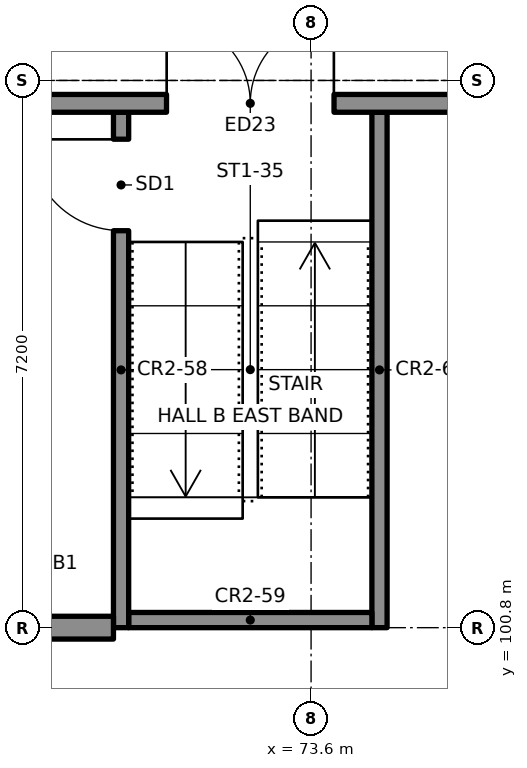
"""IFC4 building model, lengths in metres.
Left out: names, types, materials, properties, quantities, classifications, styles, units other than length and angle.
Written with IfcOpenShell. Run it as: python <this file> out.ifc"""

import sys

from ifc_helpers import new_model, si_unit, direction, frame, frame_2d, origin, place, context, subcontext, project, spatial, rectangle, extrude, element, fill, save


model = new_model("IFC4")
c1 = context("Model", 3, precision=1e-05, world=origin(), true_north=direction((0.0, 1.0)))
c2 = subcontext(c1, "Body", "Model", "MODEL_VIEW")
j1 = project(units=[si_unit("LENGTHUNIT", "METRE"), si_unit("PLANEANGLEUNIT", "RADIAN")], contexts=[c1])
p1 = place(None, origin())
s1 = spatial("IfcSite", under=j1, at=p1, CompositionType="ELEMENT")
p2 = place(p1, origin())
s2 = spatial("IfcBuilding", under=s1, at=p2, CompositionType="ELEMENT")
p3 = place(p2, origin())
s3 = spatial("IfcBuildingStorey", under=s2, at=p3, CompositionType="ELEMENT", Elevation=0.0)
p4 = place(p3, frame((26.8, 107.699, 0.0), z_axis=(0.0, 0.0, 1.0), x_axis=(1.0, 0.0, 0.0)))
e1 = element("IfcWall", 1, at=p4, inside=s3, PredefinedType="SOLIDWALL", context=c2, shape_type="SweptSolid", body=[
    extrude(rectangle(XDim=50.4, YDim=0.234, at=frame_2d((25.2, 0.0))), origin(), (0.0, 0.0, 1.0), 4.4),
])
p5 = place(p4, frame((9.6, 0.0, 1.0)))
e2 = element("IfcOpeningElement", 2, at=p5, cuts=e1, PredefinedType="OPENING", context=c2, shape_type="SweptSolid", body=[
    extrude(rectangle(XDim=2.4, YDim=2.4, at=frame_2d((1.2, 1.2))), frame((0.0, 0.127, 0.0), z_axis=(0.0, -1.0, 0.0), x_axis=(1.0, 0.0, 0.0)), (0.0, 0.0, 1.0), 0.254),
])
p6 = place(p4, frame((21.6, 0.0, 1.0)))
e3 = element("IfcOpeningElement", 3, at=p6, cuts=e1, PredefinedType="OPENING", context=c2, shape_type="SweptSolid", body=[
    extrude(rectangle(XDim=2.4, YDim=2.4, at=frame_2d((1.2, 1.2))), frame((0.0, 0.127, 0.0), z_axis=(0.0, -1.0, 0.0), x_axis=(1.0, 0.0, 0.0)), (0.0, 0.0, 1.0), 0.254),
])
p7 = place(p4, frame((26.4, 0.0, 1.0)))
e4 = element("IfcOpeningElement", 4, at=p7, cuts=e1, PredefinedType="OPENING", context=c2, shape_type="SweptSolid", body=[
    extrude(rectangle(XDim=2.4, YDim=2.4, at=frame_2d((1.2, 1.2))), frame((0.0, 0.127, 0.0), z_axis=(0.0, -1.0, 0.0), x_axis=(1.0, 0.0, 0.0)), (0.0, 0.0, 1.0), 0.254),
])
p8 = place(p4, frame((38.4, 0.0, 1.0)))
e5 = element("IfcOpeningElement", 5, at=p8, cuts=e1, PredefinedType="OPENING", context=c2, shape_type="SweptSolid", body=[
    extrude(rectangle(XDim=2.4, YDim=2.4, at=frame_2d((1.2, 1.2))), frame((0.0, 0.127, 0.0), z_axis=(0.0, -1.0, 0.0), x_axis=(1.0, 0.0, 0.0)), (0.0, 0.0, 1.0), 0.254),
])
p9 = place(p4, frame((14.4, 0.0, 0.0)))
e6 = element("IfcOpeningElement", 6, at=p9, cuts=e1, PredefinedType="OPENING", context=c2, shape_type="SweptSolid", body=[
    extrude(rectangle(XDim=2.2, YDim=2.4, at=frame_2d((1.1, 1.2))), frame((0.0, 0.127, 0.0), z_axis=(0.0, -1.0, 0.0), x_axis=(1.0, 0.0, 0.0)), (0.0, 0.0, 1.0), 0.254),
])
p10 = place(p4, frame((33.8, 0.0, 0.0)))
e7 = element("IfcOpeningElement", 7, at=p10, cuts=e1, PredefinedType="OPENING", context=c2, shape_type="SweptSolid", body=[
    extrude(rectangle(XDim=2.2, YDim=2.4, at=frame_2d((1.1, 1.2))), frame((0.0, 0.127, 0.0), z_axis=(0.0, -1.0, 0.0), x_axis=(1.0, 0.0, 0.0)), (0.0, 0.0, 1.0), 0.254),
])
p11 = place(p4, frame((2.9, 0.0, 0.0)))
e8 = element("IfcOpeningElement", 8, at=p11, cuts=e1, PredefinedType="OPENING", context=c2, shape_type="SweptSolid", body=[
    extrude(rectangle(XDim=2.2, YDim=2.4, at=frame_2d((1.1, 1.2))), frame((0.0, 0.127, 0.0), z_axis=(0.0, -1.0, 0.0), x_axis=(1.0, 0.0, 0.0)), (0.0, 0.0, 1.0), 0.254),
])
p12 = place(p4, frame((44.9, 0.0, 0.0)))
e9 = element("IfcOpeningElement", 9, at=p12, cuts=e1, PredefinedType="OPENING", context=c2, shape_type="SweptSolid", body=[
    extrude(rectangle(XDim=2.2, YDim=2.4, at=frame_2d((1.1, 1.2))), frame((0.0, 0.127, 0.0), z_axis=(0.0, -1.0, 0.0), x_axis=(1.0, 0.0, 0.0)), (0.0, 0.0, 1.0), 0.254),
])
p13 = place(p3, frame((71.1, 100.8, 0.0), z_axis=(0.0, 0.0, 1.0), x_axis=(0.0, 1.0, 0.0)))
e10 = element("IfcWall", 10, at=p13, inside=s3, PredefinedType="SOLIDWALL", context=c2, shape_type="SweptSolid", body=[
    extrude(rectangle(XDim=6.783, YDim=0.2, at=frame_2d((3.392, 0.0))), origin(), (0.0, 0.0, 1.0), 4.4),
])
p14 = place(p13, frame((5.225, 0.0, 0.0)))
e11 = element("IfcOpeningElement", 11, at=p14, cuts=e10, PredefinedType="OPENING", context=c2, shape_type="SweptSolid", body=[
    extrude(rectangle(XDim=1.2, YDim=2.1, at=frame_2d((0.6, 1.05))), frame((0.0, 0.11, 0.0), z_axis=(0.0, -1.0, 0.0), x_axis=(1.0, 0.0, 0.0)), (0.0, 0.0, 1.0), 0.22),
])
p15 = place(p3, frame((74.5, 100.8, 0.0), z_axis=(0.0, 0.0, 1.0), x_axis=(0.0, 1.0, 0.0)))
e12 = element("IfcWall", 12, at=p15, inside=s3, PredefinedType="SOLIDWALL", context=c2, shape_type="SweptSolid", body=[
    extrude(rectangle(XDim=6.783, YDim=0.2, at=frame_2d((3.392, 0.0))), origin(), (0.0, 0.0, 1.0), 4.4),
])
p16 = place(p3, frame((71.2, 100.9, 0.0), z_axis=(0.0, 0.0, 1.0), x_axis=(1.0, 0.0, 0.0)))
e13 = element("IfcWall", 13, at=p16, inside=s3, PredefinedType="SOLIDWALL", context=c2, shape_type="SweptSolid", body=[
    extrude(rectangle(XDim=3.2, YDim=0.2, at=frame_2d((1.6, 0.0))), origin(), (0.0, 0.0, 1.0), 4.4),
])
p17 = place(p3, frame((50.5, 100.8, 0.0), z_axis=(0.0, 0.0, 1.0), x_axis=(1.0, 0.0, 0.0)))
e14 = element("IfcWall", 14, at=p17, inside=s3, PredefinedType="PARTITIONING", context=c2, shape_type="SweptSolid", body=[
    extrude(rectangle(XDim=20.5, YDim=0.3, at=frame_2d((10.25, 0.0))), origin(), (0.0, 0.0, 1.0), 3.8),
])
p18 = place(p12, origin())
e15 = element("IfcDoor", 15, at=p18, inside=s3, OperationType="DOUBLE_DOOR_SINGLE_SWING", PredefinedType="DOOR", context=c2, shape_type="SweptSolid", body=[
    extrude(rectangle(XDim=2.2, YDim=2.4, at=frame_2d((1.1, 1.2))), frame((0.0, 0.025, 0.0), z_axis=(0.0, -1.0, 0.0), x_axis=(1.0, 0.0, 0.0)), (0.0, 0.0, 1.0), 0.05),
])
fill(e9, e15)
p19 = place(p14, origin())
e16 = element("IfcDoor", 16, at=p19, inside=s3, OperationType="SINGLE_SWING_RIGHT", PredefinedType="DOOR", context=c2, shape_type="SweptSolid", body=[
    extrude(rectangle(XDim=1.2, YDim=2.1, at=frame_2d((0.6, 1.05))), frame((0.0, 0.025, 0.0), z_axis=(0.0, -1.0, 0.0), x_axis=(1.0, 0.0, 0.0)), (0.0, 0.0, 1.0), 0.05),
])
fill(e11, e16)
save(model, sys.argv[1])
